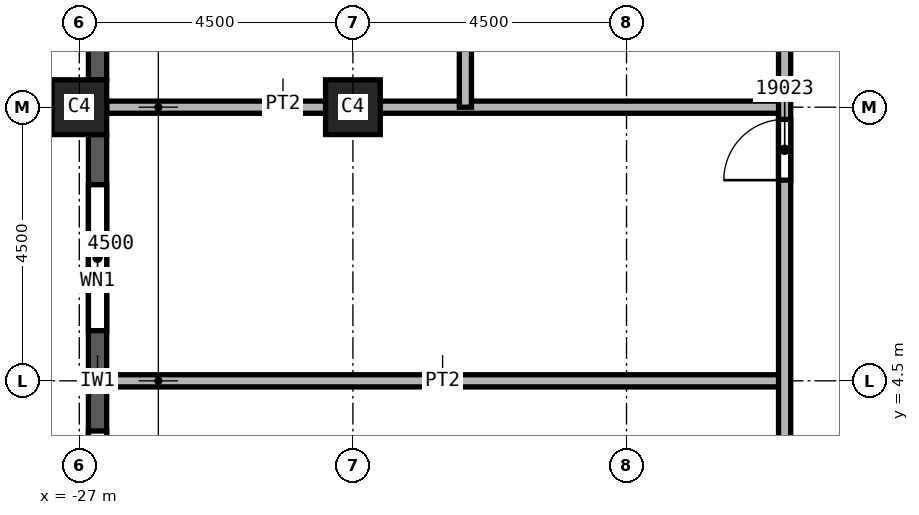
"""IFC4 building model, lengths in metres.
Left out: names, types, materials, properties, quantities, classifications, styles, units other than length and angle.
Written with IfcOpenShell. Run it as: python <this file> out.ifc"""

import sys

from ifc_helpers import new_model, si_unit, direction, frame, frame_2d, origin, origin_2d, place, context, subcontext, project, spatial, rectangle, extrude, element, fill, save


model = new_model("IFC4")
c1 = context("Model", 3, precision=1e-05, world=origin(), true_north=direction((0.0, 1.0)))
c2 = subcontext(c1, "Body", "Model", "MODEL_VIEW")
j1 = project(units=[si_unit("LENGTHUNIT", "METRE"), si_unit("PLANEANGLEUNIT", "RADIAN")], contexts=[c1])
p1 = place(None, origin())
s1 = spatial("IfcSite", under=j1, at=p1, CompositionType="ELEMENT")
p2 = place(p1, origin())
s2 = spatial("IfcBuilding", under=s1, at=p2, CompositionType="ELEMENT")
p3 = place(p2, frame((0.0, 0.0, 282.0)))
s3 = spatial("IfcBuildingStorey", under=s2, at=p3, CompositionType="ELEMENT", Elevation=282.0)
for number, where, z_axis, x_axis in (
    (1, (-22.5, 9.0, 0.0), (0.0, 0.0, 1.0), (1.0, 0.0, 0.0)),
    (2, (-27.0, 9.0, 0.0), (0.0, 0.0, 1.0), (0.0, 1.0, 0.0)),
):
    element("IfcColumn", number, at=place(p3, frame(where, z_axis=z_axis, x_axis=x_axis)), inside=s3, PredefinedType="COLUMN", context=c2, shape_type="SweptSolid", body=[
        extrude(rectangle(XDim=0.9, YDim=0.9, at=origin_2d()), origin(), (0.0, 0.0, 1.0), 3.72),
    ])
p4 = place(p3, frame((-26.7, 17.55, 0.0), z_axis=(0.0, 0.0, 1.0), x_axis=(0.0, -1.0, 0.0)))
e3 = element("IfcWall", 3, at=p4, inside=s3, PredefinedType="SOLIDWALL", context=c2, shape_type="SweptSolid", body=[
    extrude(rectangle(XDim=8.1, YDim=0.3, at=frame_2d((4.05, 0.0))), origin(), (0.0, 0.0, 1.0), 3.12),
])
p5 = place(p4, frame((0.825, 0.0, 0.8)))
e4 = element("IfcOpeningElement", 4, at=p5, cuts=e3, PredefinedType="OPENING", context=c2, shape_type="SweptSolid", body=[
    extrude(rectangle(XDim=2.4, YDim=1.95, at=frame_2d((1.2, 0.975))), frame((0.0, 0.15, 0.0), z_axis=(0.0, -1.0, 0.0), x_axis=(1.0, 0.0, 0.0)), (0.0, 0.0, 1.0), 0.3),
])
p6 = place(p4, frame((4.875, 0.0, 0.8)))
e5 = element("IfcOpeningElement", 5, at=p6, cuts=e3, PredefinedType="OPENING", context=c2, shape_type="SweptSolid", body=[
    extrude(rectangle(XDim=2.4, YDim=1.95, at=frame_2d((1.2, 0.975))), frame((0.0, 0.15, 0.0), z_axis=(0.0, -1.0, 0.0), x_axis=(1.0, 0.0, 0.0)), (0.0, 0.0, 1.0), 0.3),
])
p7 = place(p3, frame((-26.7, 8.55, 0.0), z_axis=(0.0, 0.0, 1.0), x_axis=(0.0, -1.0, 0.0)))
e6 = element("IfcWall", 6, at=p7, inside=s3, PredefinedType="SOLIDWALL", context=c2, shape_type="SweptSolid", body=[
    extrude(rectangle(XDim=8.1, YDim=0.3, at=frame_2d((4.05, 0.0))), origin(), (0.0, 0.0, 1.0), 3.12),
])
p8 = place(p7, frame((0.825, 0.0, 0.8)))
e7 = element("IfcOpeningElement", 7, at=p8, cuts=e6, PredefinedType="OPENING", context=c2, shape_type="SweptSolid", body=[
    extrude(rectangle(XDim=2.4, YDim=1.95, at=frame_2d((1.2, 0.975))), frame((0.0, 0.15, 0.0), z_axis=(0.0, -1.0, 0.0), x_axis=(1.0, 0.0, 0.0)), (0.0, 0.0, 1.0), 0.3),
])
p9 = place(p7, frame((4.875, 0.0, 0.8)))
e8 = element("IfcOpeningElement", 8, at=p9, cuts=e6, PredefinedType="OPENING", context=c2, shape_type="SweptSolid", body=[
    extrude(rectangle(XDim=2.4, YDim=1.95, at=frame_2d((1.2, 0.975))), frame((0.0, 0.15, 0.0), z_axis=(0.0, -1.0, 0.0), x_axis=(1.0, 0.0, 0.0)), (0.0, 0.0, 1.0), 0.3),
])
for number, where, z_axis, x_axis in (
    (9, (-26.55, 4.5, 0.0), (0.0, 0.0, 1.0), (1.0, 0.0, 0.0)),
    (10, (-26.55, 9.0, 0.0), (0.0, 0.0, 1.0), (1.0, 0.0, 0.0)),
):
    element("IfcWall", number, at=place(p3, frame(where, z_axis=z_axis, x_axis=x_axis)), inside=s3, PredefinedType="PARTITIONING", context=c2, shape_type="SweptSolid", body=[
        extrude(rectangle(XDim=11.15, YDim=0.2, at=frame_2d((5.575, 0.0))), origin(), (0.0, 0.0, 1.0), 3.72),
    ])
p10 = place(p3, frame((-20.65, 9.0, 0.0), z_axis=(0.0, 0.0, 1.0), x_axis=(0.0, 1.0, 0.0)))
e11 = element("IfcWall", 11, at=p10, inside=s3, PredefinedType="PARTITIONING", context=c2, shape_type="SweptSolid", body=[
    extrude(rectangle(XDim=4.5, YDim=0.2, at=frame_2d((2.25, 0.0))), origin(), (0.0, 0.0, 1.0), 3.72),
])
p11 = place(p10, frame((2.65, 0.0, 0.0)))
e12 = element("IfcOpeningElement", 12, at=p11, cuts=e11, PredefinedType="OPENING", context=c2, shape_type="SweptSolid", body=[
    extrude(rectangle(XDim=1.0, YDim=2.1, at=frame_2d((0.5, 1.05))), frame((0.0, 0.1, 0.0), z_axis=(0.0, -1.0, 0.0), x_axis=(1.0, 0.0, 0.0)), (0.0, 0.0, 1.0), 0.2),
])
p12 = place(p3, frame((-15.4, -21.9, 0.0), z_axis=(0.0, 0.0, 1.0), x_axis=(0.0, 1.0, 0.0)))
e13 = element("IfcWall", 13, at=p12, inside=s3, PredefinedType="PARTITIONING", context=c2, shape_type="SweptSolid", body=[
    extrude(rectangle(XDim=35.5, YDim=0.2, at=frame_2d((17.75, 0.0))), origin(), (0.0, 0.0, 1.0), 3.72),
])
p13 = place(p12, frame((22.05, 0.0, 0.0)))
e14 = element("IfcOpeningElement", 14, at=p13, cuts=e13, PredefinedType="OPENING", context=c2, shape_type="SweptSolid", body=[
    extrude(rectangle(XDim=1.0, YDim=2.1, at=frame_2d((0.5, 1.05))), frame((0.0, 0.1, 0.0), z_axis=(0.0, -1.0, 0.0), x_axis=(1.0, 0.0, 0.0)), (0.0, 0.0, 1.0), 0.2),
])
p14 = place(p12, frame((29.7, 0.0, 0.0)))
e15 = element("IfcOpeningElement", 15, at=p14, cuts=e13, PredefinedType="OPENING", context=c2, shape_type="SweptSolid", body=[
    extrude(rectangle(XDim=1.0, YDim=2.1, at=frame_2d((0.5, 1.05))), frame((0.0, 0.1, 0.0), z_axis=(0.0, -1.0, 0.0), x_axis=(1.0, 0.0, 0.0)), (0.0, 0.0, 1.0), 0.2),
])
p15 = place(p12, frame((1.0, 0.0, 0.0)))
e16 = element("IfcOpeningElement", 16, at=p15, cuts=e13, PredefinedType="OPENING", context=c2, shape_type="SweptSolid", body=[
    extrude(rectangle(XDim=1.0, YDim=2.1, at=frame_2d((0.5, 1.05))), frame((0.0, 0.1, 0.0), z_axis=(0.0, -1.0, 0.0), x_axis=(1.0, 0.0, 0.0)), (0.0, 0.0, 1.0), 0.2),
])
p16 = place(p12, frame((3.15, 0.0, 0.0)))
e17 = element("IfcOpeningElement", 17, at=p16, cuts=e13, PredefinedType="OPENING", context=c2, shape_type="SweptSolid", body=[
    extrude(rectangle(XDim=1.0, YDim=2.1, at=frame_2d((0.5, 1.05))), frame((0.0, 0.1, 0.0), z_axis=(0.0, -1.0, 0.0), x_axis=(1.0, 0.0, 0.0)), (0.0, 0.0, 1.0), 0.2),
])
p17 = place(p12, frame((8.4, 0.0, 0.0)))
e18 = element("IfcOpeningElement", 18, at=p17, cuts=e13, PredefinedType="OPENING", context=c2, shape_type="SweptSolid", body=[
    extrude(rectangle(XDim=1.0, YDim=2.1, at=frame_2d((0.5, 1.05))), frame((0.0, 0.1, 0.0), z_axis=(0.0, -1.0, 0.0), x_axis=(1.0, 0.0, 0.0)), (0.0, 0.0, 1.0), 0.2),
])
p18 = place(p12, frame((17.25, 0.0, 0.0)))
e19 = element("IfcOpeningElement", 19, at=p18, cuts=e13, PredefinedType="OPENING", context=c2, shape_type="SweptSolid", body=[
    extrude(rectangle(XDim=1.0, YDim=2.1, at=frame_2d((0.5, 1.05))), frame((0.0, 0.1, 0.0), z_axis=(0.0, -1.0, 0.0), x_axis=(1.0, 0.0, 0.0)), (0.0, 0.0, 1.0), 0.2),
])
p19 = place(p12, frame((20.625, 0.0, 0.0)))
e20 = element("IfcOpeningElement", 20, at=p19, cuts=e13, PredefinedType="OPENING", context=c2, shape_type="SweptSolid", body=[
    extrude(rectangle(XDim=1.0, YDim=2.1, at=frame_2d((0.5, 1.05))), frame((0.0, 0.1, 0.0), z_axis=(0.0, -1.0, 0.0), x_axis=(1.0, 0.0, 0.0)), (0.0, 0.0, 1.0), 0.2),
])
p20 = place(p8, origin())
e21 = element("IfcWindow", 21, at=p20, inside=s3, PartitioningType="SINGLE_PANEL", PredefinedType="WINDOW", context=c2, shape_type="SweptSolid", body=[
    extrude(rectangle(XDim=2.4, YDim=1.95, at=frame_2d((1.2, 0.975))), frame((0.0, 0.03, 0.0), z_axis=(0.0, -1.0, 0.0), x_axis=(1.0, 0.0, 0.0)), (0.0, 0.0, 1.0), 0.06),
])
fill(e7, e21)
p21 = place(p9, origin())
e22 = element("IfcWindow", 22, at=p21, inside=s3, PartitioningType="SINGLE_PANEL", PredefinedType="WINDOW", context=c2, shape_type="SweptSolid", body=[
    extrude(rectangle(XDim=2.4, YDim=1.95, at=frame_2d((1.2, 0.975))), frame((0.0, 0.03, 0.0), z_axis=(0.0, -1.0, 0.0), x_axis=(1.0, 0.0, 0.0)), (0.0, 0.0, 1.0), 0.06),
])
fill(e8, e22)
p22 = place(p14, origin())
e23 = element("IfcDoor", 23, at=p22, inside=s3, OperationType="SINGLE_SWING_RIGHT", PredefinedType="DOOR", context=c2, shape_type="SweptSolid", body=[
    extrude(rectangle(XDim=1.0, YDim=2.1, at=frame_2d((0.5, 1.05))), frame((0.0, 0.025, 0.0), z_axis=(0.0, -1.0, 0.0), x_axis=(1.0, 0.0, 0.0)), (0.0, 0.0, 1.0), 0.05),
])
fill(e15, e23)
save(model, sys.argv[1])
